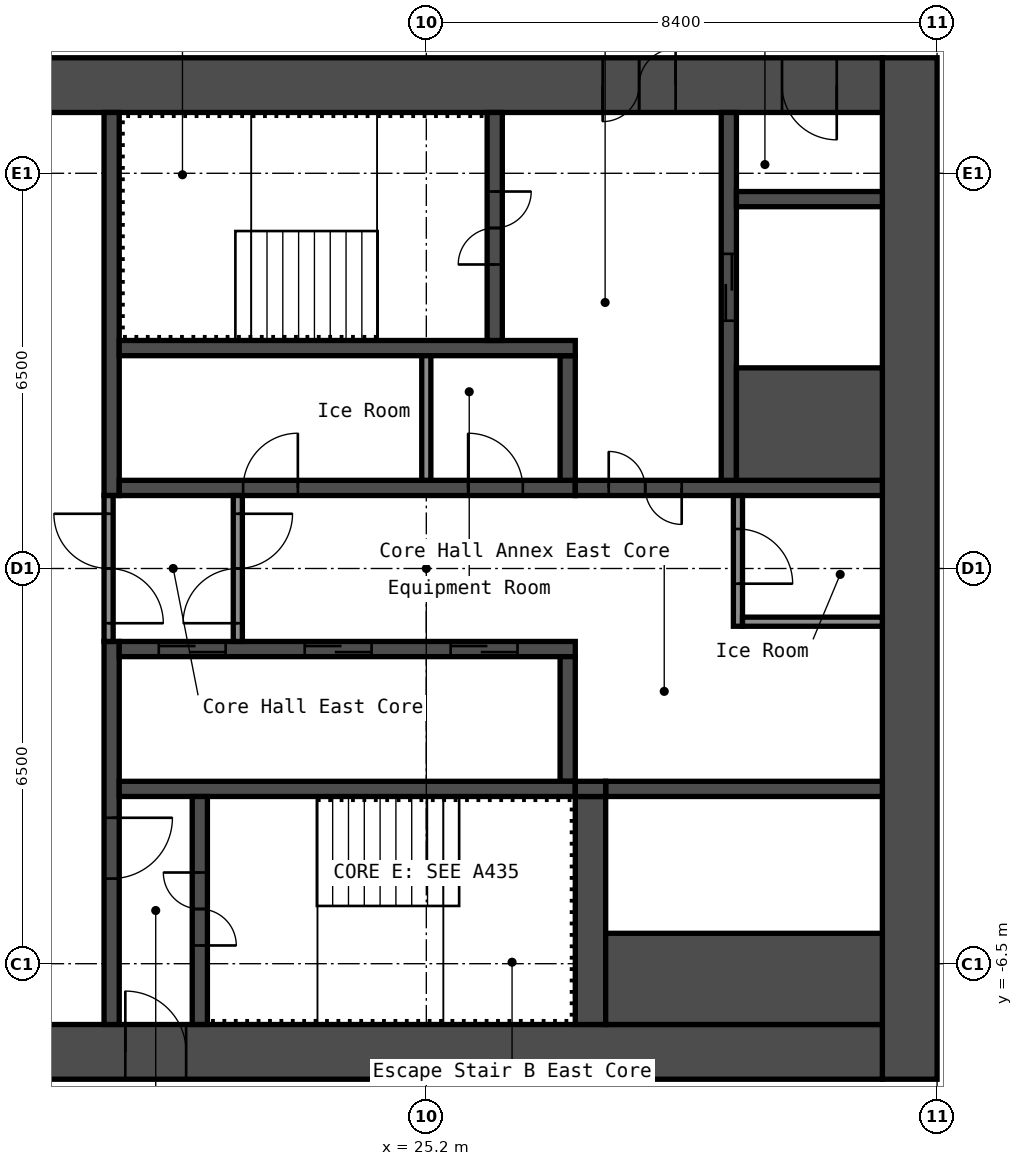
"""IFC4 building model, lengths in metres.
Left out: names, types, materials, properties, quantities, classifications, styles, units other than length and angle.
Written with IfcOpenShell. Run it as: python <this file> out.ifc"""

import sys

from ifc_helpers import new_model, si_unit, direction, frame, frame_2d, origin, place, context, subcontext, project, spatial, rectangle, extrude, element, fill, save


model = new_model("IFC4")
c1 = context("Model", 3, precision=1e-05, world=origin(), true_north=direction((0.0, 1.0)))
c2 = subcontext(c1, "Body", "Model", "MODEL_VIEW")
j1 = project(units=[si_unit("LENGTHUNIT", "METRE"), si_unit("PLANEANGLEUNIT", "RADIAN")], contexts=[c1])
p1 = place(None, origin())
s1 = spatial("IfcSite", under=j1, at=p1, CompositionType="ELEMENT")
p2 = place(p1, origin())
s2 = spatial("IfcBuilding", under=s1, at=p2, CompositionType="ELEMENT")
p3 = place(p2, frame((0.0, 0.0, 245.4)))
s3 = spatial("IfcBuildingStorey", under=s2, at=p3, CompositionType="ELEMENT", Elevation=245.4)
p4 = place(p3, frame((33.15, -8.4, 0.0), z_axis=(0.0, 0.0, 1.0), x_axis=(0.0, 1.0, 0.0)))
e1 = element("IfcWall", 1, at=p4, inside=s3, PredefinedType="SHEAR", context=c2, shape_type="SweptSolid", body=[
    extrude(rectangle(XDim=16.8, YDim=0.9, at=frame_2d((8.4, 0.0))), origin(), (0.0, 0.0, 1.0), 2.75),
])
p5 = place(p3, frame((17.7, 7.95, 0.0), z_axis=(0.0, 0.0, 1.0), x_axis=(1.0, 0.0, 0.0)))
e2 = element("IfcWall", 2, at=p5, inside=s3, PredefinedType="SHEAR", context=c2, shape_type="SweptSolid", body=[
    extrude(rectangle(XDim=15.0, YDim=0.9, at=frame_2d((7.5, 0.0))), origin(), (0.0, 0.0, 1.0), 2.75),
])
p6 = place(p5, frame((10.4, 0.0, 0.0)))
e3 = element("IfcOpeningElement", 3, at=p6, cuts=e2, PredefinedType="OPENING", context=c2, shape_type="SweptSolid", body=[
    extrude(rectangle(XDim=1.2, YDim=2.1, at=frame_2d((0.6, 1.05))), frame((0.0, 0.46, 0.0), z_axis=(0.0, -1.0, 0.0), x_axis=(1.0, 0.0, 0.0)), (0.0, 0.0, 1.0), 0.92),
])
p7 = place(p5, frame((13.35, 0.0, 0.0)))
e4 = element("IfcOpeningElement", 4, at=p7, cuts=e2, PredefinedType="OPENING", context=c2, shape_type="SweptSolid", body=[
    extrude(rectangle(XDim=0.9, YDim=2.1, at=frame_2d((0.45, 1.05))), frame((0.0, 0.46, 0.0), z_axis=(0.0, -1.0, 0.0), x_axis=(1.0, 0.0, 0.0)), (0.0, 0.0, 1.0), 0.92),
])
p8 = place(p3, frame((17.7, -7.95, 0.0), z_axis=(0.0, 0.0, 1.0), x_axis=(1.0, 0.0, 0.0)))
e5 = element("IfcWall", 5, at=p8, inside=s3, PredefinedType="SHEAR", context=c2, shape_type="SweptSolid", body=[
    extrude(rectangle(XDim=15.0, YDim=0.9, at=frame_2d((7.5, 0.0))), origin(), (0.0, 0.0, 1.0), 2.75),
])
p9 = place(p8, frame((2.55, 0.0, 0.0)))
e6 = element("IfcOpeningElement", 6, at=p9, cuts=e5, PredefinedType="OPENING", context=c2, shape_type="SweptSolid", body=[
    extrude(rectangle(XDim=1.0, YDim=2.1, at=frame_2d((0.5, 1.05))), frame((0.0, 0.46, 0.0), z_axis=(0.0, -1.0, 0.0), x_axis=(1.0, 0.0, 0.0)), (0.0, 0.0, 1.0), 0.92),
])
p10 = place(p3, frame((20.025, 1.2, 0.0), z_axis=(0.0, 0.0, 1.0), x_axis=(0.0, 1.0, 0.0)))
e7 = element("IfcWall", 7, at=p10, inside=s3, PredefinedType="SHEAR", context=c2, shape_type="SweptSolid", body=[
    extrude(rectangle(XDim=6.3, YDim=0.25, at=frame_2d((3.15, 0.0))), origin(), (0.0, 0.0, 1.0), 2.75),
])
p11 = place(p3, frame((20.025, -7.5, 0.0), z_axis=(0.0, 0.0, 1.0), x_axis=(0.0, 1.0, 0.0)))
e8 = element("IfcWall", 8, at=p11, inside=s3, PredefinedType="SHEAR", context=c2, shape_type="SweptSolid", body=[
    extrude(rectangle(XDim=6.3, YDim=0.25, at=frame_2d((3.15, 0.0))), origin(), (0.0, 0.0, 1.0), 2.75),
])
p12 = place(p11, frame((2.4, 0.0, 0.0)))
e9 = element("IfcOpeningElement", 9, at=p12, cuts=e8, PredefinedType="OPENING", context=c2, shape_type="SweptSolid", body=[
    extrude(rectangle(XDim=1.0, YDim=2.1, at=frame_2d((0.5, 1.05))), frame((0.0, 0.135, 0.0), z_axis=(0.0, -1.0, 0.0), x_axis=(1.0, 0.0, 0.0)), (0.0, 0.0, 1.0), 0.27),
])
p13 = place(p3, frame((20.15, 1.325, 0.0), z_axis=(0.0, 0.0, 1.0), x_axis=(1.0, 0.0, 0.0)))
e10 = element("IfcWall", 10, at=p13, inside=s3, PredefinedType="SHEAR", context=c2, shape_type="SweptSolid", body=[
    extrude(rectangle(XDim=7.5, YDim=0.25, at=frame_2d((3.75, 0.0))), origin(), (0.0, 0.0, 1.0), 2.75),
])
p14 = place(p13, frame((2.038, 0.0, 0.0)))
e11 = element("IfcOpeningElement", 11, at=p14, cuts=e10, PredefinedType="OPENING", context=c2, shape_type="SweptSolid", body=[
    extrude(rectangle(XDim=0.9, YDim=2.1, at=frame_2d((0.45, 1.05))), frame((0.0, 0.135, 0.0), z_axis=(0.0, -1.0, 0.0), x_axis=(1.0, 0.0, 0.0)), (0.0, 0.0, 1.0), 0.27),
])
p15 = place(p13, frame((5.738, 0.0, 0.0)))
e12 = element("IfcOpeningElement", 12, at=p15, cuts=e10, PredefinedType="OPENING", context=c2, shape_type="SweptSolid", body=[
    extrude(rectangle(XDim=0.9, YDim=2.1, at=frame_2d((0.45, 1.05))), frame((0.0, 0.135, 0.0), z_axis=(0.0, -1.0, 0.0), x_axis=(1.0, 0.0, 0.0)), (0.0, 0.0, 1.0), 0.27),
])
p16 = place(p3, frame((27.525, 1.45, 0.0), z_axis=(0.0, 0.0, 1.0), x_axis=(0.0, 1.0, 0.0)))
e13 = element("IfcWall", 13, at=p16, inside=s3, PredefinedType="SHEAR", context=c2, shape_type="SweptSolid", body=[
    extrude(rectangle(XDim=2.05, YDim=0.25, at=frame_2d((1.025, 0.0))), origin(), (0.0, 0.0, 1.0), 2.75),
])
p17 = place(p3, frame((20.15, 3.625, 0.0), z_axis=(0.0, 0.0, 1.0), x_axis=(1.0, 0.0, 0.0)))
e14 = element("IfcWall", 14, at=p17, inside=s3, PredefinedType="SHEAR", context=c2, shape_type="SweptSolid", body=[
    extrude(rectangle(XDim=7.5, YDim=0.25, at=frame_2d((3.75, 0.0))), origin(), (0.0, 0.0, 1.0), 2.75),
])
p18 = place(p3, frame((26.325, 3.75, 0.0), z_axis=(0.0, 0.0, 1.0), x_axis=(0.0, 1.0, 0.0)))
e15 = element("IfcWall", 15, at=p18, inside=s3, PredefinedType="SHEAR", context=c2, shape_type="SweptSolid", body=[
    extrude(rectangle(XDim=3.75, YDim=0.25, at=frame_2d((1.875, 0.0))), origin(), (0.0, 0.0, 1.0), 2.75),
])
p19 = place(p18, frame((1.25, 0.0, 0.0)))
e16 = element("IfcOpeningElement", 16, at=p19, cuts=e15, PredefinedType="OPENING", context=c2, shape_type="SweptSolid", body=[
    extrude(rectangle(XDim=1.2, YDim=2.1, at=frame_2d((0.6, 1.05))), frame((0.0, 0.135, 0.0), z_axis=(0.0, -1.0, 0.0), x_axis=(1.0, 0.0, 0.0)), (0.0, 0.0, 1.0), 0.27),
])
p20 = place(p3, frame((27.65, 1.325, 0.0), z_axis=(0.0, 0.0, 1.0), x_axis=(1.0, 0.0, 0.0)))
e17 = element("IfcWall", 17, at=p20, inside=s3, PredefinedType="SHEAR", context=c2, shape_type="SweptSolid", body=[
    extrude(rectangle(XDim=5.05, YDim=0.25, at=frame_2d((2.525, 0.0))), origin(), (0.0, 0.0, 1.0), 2.75),
])
p21 = place(p20, frame((0.55, 0.0, 0.0)))
e18 = element("IfcOpeningElement", 18, at=p21, cuts=e17, PredefinedType="OPENING", context=c2, shape_type="SweptSolid", body=[
    extrude(rectangle(XDim=1.2, YDim=2.1, at=frame_2d((0.6, 1.05))), frame((0.0, 0.135, 0.0), z_axis=(0.0, -1.0, 0.0), x_axis=(1.0, 0.0, 0.0)), (0.0, 0.0, 1.0), 0.27),
])
p22 = place(p3, frame((30.175, 1.45, 0.0), z_axis=(0.0, 0.0, 1.0), x_axis=(0.0, 1.0, 0.0)))
e19 = element("IfcWall", 19, at=p22, inside=s3, PredefinedType="SHEAR", context=c2, shape_type="SweptSolid", body=[
    extrude(rectangle(XDim=6.05, YDim=0.25, at=frame_2d((3.025, 0.0))), origin(), (0.0, 0.0, 1.0), 2.75),
])
p23 = place(p22, frame((2.625, 0.0, 0.0)))
e20 = element("IfcOpeningElement", 20, at=p23, cuts=e19, PredefinedType="OPENING", context=c2, shape_type="SweptSolid", body=[
    extrude(rectangle(XDim=1.1, YDim=2.1, at=frame_2d((0.55, 1.05))), frame((0.0, 0.135, 0.0), z_axis=(0.0, -1.0, 0.0), x_axis=(1.0, 0.0, 0.0)), (0.0, 0.0, 1.0), 0.27),
])
p24 = place(p3, frame((30.3, 2.375, 0.0), z_axis=(0.0, 0.0, 1.0), x_axis=(1.0, 0.0, 0.0)))
e21 = element("IfcWall", 21, at=p24, inside=s3, PredefinedType="SHEAR", context=c2, shape_type="SweptSolid", body=[
    extrude(rectangle(XDim=2.4, YDim=1.85, at=frame_2d((1.2, 0.0))), origin(), (0.0, 0.0, 1.0), 2.75),
])
p25 = place(p3, frame((30.3, 6.075, 0.0), z_axis=(0.0, 0.0, 1.0), x_axis=(1.0, 0.0, 0.0)))
e22 = element("IfcWall", 22, at=p25, inside=s3, PredefinedType="SHEAR", context=c2, shape_type="SweptSolid", body=[
    extrude(rectangle(XDim=2.4, YDim=0.25, at=frame_2d((1.2, 0.0))), origin(), (0.0, 0.0, 1.0), 2.75),
])
p26 = place(p3, frame((20.15, -1.325, 0.0), z_axis=(0.0, 0.0, 1.0), x_axis=(1.0, 0.0, 0.0)))
e23 = element("IfcWall", 23, at=p26, inside=s3, PredefinedType="SHEAR", context=c2, shape_type="SweptSolid", body=[
    extrude(rectangle(XDim=7.5, YDim=0.25, at=frame_2d((3.75, 0.0))), origin(), (0.0, 0.0, 1.0), 2.75),
])
p27 = place(p26, frame((0.65, 0.0, 0.0)))
e24 = element("IfcOpeningElement", 24, at=p27, cuts=e23, PredefinedType="OPENING", context=c2, shape_type="SweptSolid", body=[
    extrude(rectangle(XDim=1.1, YDim=2.1, at=frame_2d((0.55, 1.05))), frame((0.0, 0.135, 0.0), z_axis=(0.0, -1.0, 0.0), x_axis=(1.0, 0.0, 0.0)), (0.0, 0.0, 1.0), 0.27),
])
p28 = place(p26, frame((3.05, 0.0, 0.0)))
e25 = element("IfcOpeningElement", 25, at=p28, cuts=e23, PredefinedType="OPENING", context=c2, shape_type="SweptSolid", body=[
    extrude(rectangle(XDim=1.1, YDim=2.1, at=frame_2d((0.55, 1.05))), frame((0.0, 0.135, 0.0), z_axis=(0.0, -1.0, 0.0), x_axis=(1.0, 0.0, 0.0)), (0.0, 0.0, 1.0), 0.27),
])
p29 = place(p26, frame((5.45, 0.0, 0.0)))
e26 = element("IfcOpeningElement", 26, at=p29, cuts=e23, PredefinedType="OPENING", context=c2, shape_type="SweptSolid", body=[
    extrude(rectangle(XDim=1.1, YDim=2.1, at=frame_2d((0.55, 1.05))), frame((0.0, 0.135, 0.0), z_axis=(0.0, -1.0, 0.0), x_axis=(1.0, 0.0, 0.0)), (0.0, 0.0, 1.0), 0.27),
])
p30 = place(p3, frame((27.525, -3.5, 0.0), z_axis=(0.0, 0.0, 1.0), x_axis=(0.0, 1.0, 0.0)))
e27 = element("IfcWall", 27, at=p30, inside=s3, PredefinedType="SHEAR", context=c2, shape_type="SweptSolid", body=[
    extrude(rectangle(XDim=2.05, YDim=0.25, at=frame_2d((1.025, 0.0))), origin(), (0.0, 0.0, 1.0), 2.75),
])
p31 = place(p3, frame((20.15, -3.625, 0.0), z_axis=(0.0, 0.0, 1.0), x_axis=(1.0, 0.0, 0.0)))
e28 = element("IfcWall", 28, at=p31, inside=s3, PredefinedType="SHEAR", context=c2, shape_type="SweptSolid", body=[
    extrude(rectangle(XDim=7.5, YDim=0.25, at=frame_2d((3.75, 0.0))), origin(), (0.0, 0.0, 1.0), 2.75),
])
p32 = place(p3, frame((21.475, -7.5, 0.0), z_axis=(0.0, 0.0, 1.0), x_axis=(0.0, 1.0, 0.0)))
e29 = element("IfcWall", 29, at=p32, inside=s3, PredefinedType="SHEAR", context=c2, shape_type="SweptSolid", body=[
    extrude(rectangle(XDim=3.75, YDim=0.25, at=frame_2d((1.875, 0.0))), origin(), (0.0, 0.0, 1.0), 2.75),
])
p33 = place(p32, frame((1.3, 0.0, 0.0)))
e30 = element("IfcOpeningElement", 30, at=p33, cuts=e29, PredefinedType="OPENING", context=c2, shape_type="SweptSolid", body=[
    extrude(rectangle(XDim=1.2, YDim=2.1, at=frame_2d((0.6, 1.05))), frame((0.0, 0.135, 0.0), z_axis=(0.0, -1.0, 0.0), x_axis=(1.0, 0.0, 0.0)), (0.0, 0.0, 1.0), 0.27),
])
p34 = place(p3, frame((27.9, -7.5, 0.0), z_axis=(0.0, 0.0, 1.0), x_axis=(0.0, 1.0, 0.0)))
e31 = element("IfcWall", 31, at=p34, inside=s3, PredefinedType="SHEAR", context=c2, shape_type="SweptSolid", body=[
    extrude(rectangle(XDim=3.75, YDim=0.5, at=frame_2d((1.875, 0.0))), origin(), (0.0, 0.0, 1.0), 2.75),
])
p35 = place(p3, frame((28.15, -3.625, 0.0), z_axis=(0.0, 0.0, 1.0), x_axis=(1.0, 0.0, 0.0)))
e32 = element("IfcWall", 32, at=p35, inside=s3, PredefinedType="SHEAR", context=c2, shape_type="SweptSolid", body=[
    extrude(rectangle(XDim=4.55, YDim=0.25, at=frame_2d((2.275, 0.0))), origin(), (0.0, 0.0, 1.0), 2.75),
])
p36 = place(p3, frame((28.15, -6.75, 0.0), z_axis=(0.0, 0.0, 1.0), x_axis=(1.0, 0.0, 0.0)))
e33 = element("IfcWall", 33, at=p36, inside=s3, PredefinedType="SHEAR", context=c2, shape_type="SweptSolid", body=[
    extrude(rectangle(XDim=4.55, YDim=1.5, at=frame_2d((2.275, 0.0))), origin(), (0.0, 0.0, 1.0), 2.75),
])
p37 = place(p3, frame((27.65, -3.625, 0.0), z_axis=(0.0, 0.0, 1.0), x_axis=(1.0, 0.0, 0.0)))
e34 = element("IfcWall", 34, at=p37, inside=s3, PredefinedType="SHEAR", context=c2, shape_type="SweptSolid", body=[
    extrude(rectangle(XDim=0.5, YDim=0.25, at=frame_2d((0.25, 0.0))), origin(), (0.0, 0.0, 1.0), 2.75),
])
p38 = place(p3, frame((19.975, -1.2, 0.0), z_axis=(0.0, 0.0, 1.0), x_axis=(0.0, 1.0, 0.0)))
e35 = element("IfcWall", 35, at=p38, inside=s3, PredefinedType="PARTITIONING", context=c2, shape_type="SweptSolid", body=[
    extrude(rectangle(XDim=2.4, YDim=0.15, at=frame_2d((1.2, 0.0))), origin(), (0.0, 0.0, 1.0), 2.75),
])
p39 = place(p38, frame((0.3, 0.0, 0.0)))
e36 = element("IfcOpeningElement", 36, at=p39, cuts=e35, PredefinedType="OPENING", context=c2, shape_type="SweptSolid", body=[
    extrude(rectangle(XDim=1.8, YDim=2.1, at=frame_2d((0.9, 1.05))), frame((0.0, 0.085, 0.0), z_axis=(0.0, -1.0, 0.0), x_axis=(1.0, 0.0, 0.0)), (0.0, 0.0, 1.0), 0.17),
])
p40 = place(p3, frame((22.1, -1.2, 0.0), z_axis=(0.0, 0.0, 1.0), x_axis=(0.0, 1.0, 0.0)))
e37 = element("IfcWall", 37, at=p40, inside=s3, PredefinedType="PARTITIONING", context=c2, shape_type="SweptSolid", body=[
    extrude(rectangle(XDim=2.4, YDim=0.15, at=frame_2d((1.2, 0.0))), origin(), (0.0, 0.0, 1.0), 2.75),
])
p41 = place(p40, frame((0.3, 0.0, 0.0)))
e38 = element("IfcOpeningElement", 38, at=p41, cuts=e37, PredefinedType="OPENING", context=c2, shape_type="SweptSolid", body=[
    extrude(rectangle(XDim=1.8, YDim=2.1, at=frame_2d((0.9, 1.05))), frame((0.0, 0.085, 0.0), z_axis=(0.0, -1.0, 0.0), x_axis=(1.0, 0.0, 0.0)), (0.0, 0.0, 1.0), 0.17),
])
p42 = place(p3, frame((30.325, -0.95, 0.0), z_axis=(0.0, 0.0, 1.0), x_axis=(0.0, 1.0, 0.0)))
e39 = element("IfcWall", 39, at=p42, inside=s3, PredefinedType="PARTITIONING", context=c2, shape_type="SweptSolid", body=[
    extrude(rectangle(XDim=2.15, YDim=0.15, at=frame_2d((1.075, 0.0))), origin(), (0.0, 0.0, 1.0), 2.75),
])
p43 = place(p42, frame((0.7, 0.0, 0.0)))
e40 = element("IfcOpeningElement", 40, at=p43, cuts=e39, PredefinedType="OPENING", context=c2, shape_type="SweptSolid", body=[
    extrude(rectangle(XDim=0.9, YDim=2.1, at=frame_2d((0.45, 1.05))), frame((0.0, 0.085, 0.0), z_axis=(0.0, -1.0, 0.0), x_axis=(1.0, 0.0, 0.0)), (0.0, 0.0, 1.0), 0.17),
])
p44 = place(p3, frame((30.4, -0.875, 0.0), z_axis=(0.0, 0.0, 1.0), x_axis=(1.0, 0.0, 0.0)))
e41 = element("IfcWall", 41, at=p44, inside=s3, PredefinedType="PARTITIONING", context=c2, shape_type="SweptSolid", body=[
    extrude(rectangle(XDim=2.3, YDim=0.15, at=frame_2d((1.15, 0.0))), origin(), (0.0, 0.0, 1.0), 2.75),
])
p45 = place(p3, frame((25.2, 1.45, 0.0), z_axis=(0.0, 0.0, 1.0), x_axis=(0.0, 1.0, 0.0)))
e42 = element("IfcWall", 42, at=p45, inside=s3, PredefinedType="PARTITIONING", context=c2, shape_type="SweptSolid", body=[
    extrude(rectangle(XDim=2.05, YDim=0.15, at=frame_2d((1.025, 0.0))), origin(), (0.0, 0.0, 1.0), 2.75),
])
p46 = place(p6, origin())
e43 = element("IfcDoor", 43, at=p46, inside=s3, OperationType="DOUBLE_DOOR_SINGLE_SWING", PredefinedType="DOOR", context=c2, shape_type="SweptSolid", body=[
    extrude(rectangle(XDim=1.2, YDim=2.1, at=frame_2d((0.6, 1.05))), frame((0.0, 0.025, 0.0), z_axis=(0.0, -1.0, 0.0), x_axis=(1.0, 0.0, 0.0)), (0.0, 0.0, 1.0), 0.05),
])
fill(e3, e43)
p47 = place(p7, origin())
e44 = element("IfcDoor", 44, at=p47, inside=s3, OperationType="SINGLE_SWING_RIGHT", PredefinedType="DOOR", context=c2, shape_type="SweptSolid", body=[
    extrude(rectangle(XDim=0.9, YDim=2.1, at=frame_2d((0.45, 1.05))), frame((0.0, 0.025, 0.0), z_axis=(0.0, -1.0, 0.0), x_axis=(1.0, 0.0, 0.0)), (0.0, 0.0, 1.0), 0.05),
])
fill(e4, e44)
p48 = place(p9, origin())
e45 = element("IfcDoor", 45, at=p48, inside=s3, OperationType="SINGLE_SWING_RIGHT", PredefinedType="DOOR", context=c2, shape_type="SweptSolid", body=[
    extrude(rectangle(XDim=1.0, YDim=2.1, at=frame_2d((0.5, 1.05))), frame((0.0, 0.025, 0.0), z_axis=(0.0, -1.0, 0.0), x_axis=(1.0, 0.0, 0.0)), (0.0, 0.0, 1.0), 0.05),
])
fill(e6, e45)
p49 = place(p19, origin())
e46 = element("IfcDoor", 46, at=p49, inside=s3, OperationType="DOUBLE_DOOR_SINGLE_SWING", PredefinedType="DOOR", context=c2, shape_type="SweptSolid", body=[
    extrude(rectangle(XDim=1.2, YDim=2.1, at=frame_2d((0.6, 1.05))), frame((0.0, 0.025, 0.0), z_axis=(0.0, -1.0, 0.0), x_axis=(1.0, 0.0, 0.0)), (0.0, 0.0, 1.0), 0.05),
])
fill(e16, e46)
p50 = place(p33, origin())
e47 = element("IfcDoor", 47, at=p50, inside=s3, OperationType="DOUBLE_DOOR_SINGLE_SWING", PredefinedType="DOOR", context=c2, shape_type="SweptSolid", body=[
    extrude(rectangle(XDim=1.2, YDim=2.1, at=frame_2d((0.6, 1.05))), frame((0.0, 0.025, 0.0), z_axis=(0.0, -1.0, 0.0), x_axis=(1.0, 0.0, 0.0)), (0.0, 0.0, 1.0), 0.05),
])
fill(e30, e47)
p51 = place(p12, origin())
e48 = element("IfcDoor", 48, at=p51, inside=s3, OperationType="SINGLE_SWING_RIGHT", PredefinedType="DOOR", context=c2, shape_type="SweptSolid", body=[
    extrude(rectangle(XDim=1.0, YDim=2.1, at=frame_2d((0.5, 1.05))), frame((0.0, 0.025, 0.0), z_axis=(0.0, -1.0, 0.0), x_axis=(1.0, 0.0, 0.0)), (0.0, 0.0, 1.0), 0.05),
])
fill(e9, e48)
p52 = place(p21, origin())
e49 = element("IfcDoor", 49, at=p52, inside=s3, OperationType="DOUBLE_DOOR_SINGLE_SWING", PredefinedType="DOOR", context=c2, shape_type="SweptSolid", body=[
    extrude(rectangle(XDim=1.2, YDim=2.1, at=frame_2d((0.6, 1.05))), frame((0.0, 0.025, 0.0), z_axis=(0.0, -1.0, 0.0), x_axis=(1.0, 0.0, 0.0)), (0.0, 0.0, 1.0), 0.05),
])
fill(e18, e49)
p53 = place(p39, origin())
e50 = element("IfcDoor", 50, at=p53, inside=s3, OperationType="DOUBLE_DOOR_SINGLE_SWING", PredefinedType="DOOR", context=c2, shape_type="SweptSolid", body=[
    extrude(rectangle(XDim=1.8, YDim=2.1, at=frame_2d((0.9, 1.05))), frame((0.0, 0.025, 0.0), z_axis=(0.0, -1.0, 0.0), x_axis=(1.0, 0.0, 0.0)), (0.0, 0.0, 1.0), 0.05),
])
fill(e36, e50)
p54 = place(p41, origin())
e51 = element("IfcDoor", 51, at=p54, inside=s3, OperationType="DOUBLE_DOOR_SINGLE_SWING", PredefinedType="DOOR", context=c2, shape_type="SweptSolid", body=[
    extrude(rectangle(XDim=1.8, YDim=2.1, at=frame_2d((0.9, 1.05))), frame((0.0, 0.025, 0.0), z_axis=(0.0, -1.0, 0.0), x_axis=(1.0, 0.0, 0.0)), (0.0, 0.0, 1.0), 0.05),
])
fill(e38, e51)
p55 = place(p43, origin())
e52 = element("IfcDoor", 52, at=p55, inside=s3, OperationType="SINGLE_SWING_LEFT", PredefinedType="DOOR", context=c2, shape_type="SweptSolid", body=[
    extrude(rectangle(XDim=0.9, YDim=2.1, at=frame_2d((0.45, 1.05))), frame((0.0, 0.025, 0.0), z_axis=(0.0, -1.0, 0.0), x_axis=(1.0, 0.0, 0.0)), (0.0, 0.0, 1.0), 0.05),
])
fill(e40, e52)
p56 = place(p14, origin())
e53 = element("IfcDoor", 53, at=p56, inside=s3, OperationType="SINGLE_SWING_LEFT", PredefinedType="DOOR", context=c2, shape_type="SweptSolid", body=[
    extrude(rectangle(XDim=0.9, YDim=2.1, at=frame_2d((0.45, 1.05))), frame((0.0, 0.025, 0.0), z_axis=(0.0, -1.0, 0.0), x_axis=(1.0, 0.0, 0.0)), (0.0, 0.0, 1.0), 0.05),
])
fill(e11, e53)
p57 = place(p15, origin())
e54 = element("IfcDoor", 54, at=p57, inside=s3, OperationType="SINGLE_SWING_RIGHT", PredefinedType="DOOR", context=c2, shape_type="SweptSolid", body=[
    extrude(rectangle(XDim=0.9, YDim=2.1, at=frame_2d((0.45, 1.05))), frame((0.0, 0.025, 0.0), z_axis=(0.0, -1.0, 0.0), x_axis=(1.0, 0.0, 0.0)), (0.0, 0.0, 1.0), 0.05),
])
fill(e12, e54)
p58 = place(p27, origin())
e55 = element("IfcDoor", 55, at=p58, inside=s3, OperationType="DOUBLE_DOOR_SLIDING", PredefinedType="DOOR", context=c2, shape_type="SweptSolid", body=[
    extrude(rectangle(XDim=1.1, YDim=2.1, at=frame_2d((0.55, 1.05))), frame((0.0, 0.025, 0.0), z_axis=(0.0, -1.0, 0.0), x_axis=(1.0, 0.0, 0.0)), (0.0, 0.0, 1.0), 0.05),
])
fill(e24, e55)
p59 = place(p28, origin())
e56 = element("IfcDoor", 56, at=p59, inside=s3, OperationType="DOUBLE_DOOR_SLIDING", PredefinedType="DOOR", context=c2, shape_type="SweptSolid", body=[
    extrude(rectangle(XDim=1.1, YDim=2.1, at=frame_2d((0.55, 1.05))), frame((0.0, 0.025, 0.0), z_axis=(0.0, -1.0, 0.0), x_axis=(1.0, 0.0, 0.0)), (0.0, 0.0, 1.0), 0.05),
])
fill(e25, e56)
p60 = place(p29, origin())
e57 = element("IfcDoor", 57, at=p60, inside=s3, OperationType="DOUBLE_DOOR_SLIDING", PredefinedType="DOOR", context=c2, shape_type="SweptSolid", body=[
    extrude(rectangle(XDim=1.1, YDim=2.1, at=frame_2d((0.55, 1.05))), frame((0.0, 0.025, 0.0), z_axis=(0.0, -1.0, 0.0), x_axis=(1.0, 0.0, 0.0)), (0.0, 0.0, 1.0), 0.05),
])
fill(e26, e57)
p61 = place(p23, origin())
e58 = element("IfcDoor", 58, at=p61, inside=s3, OperationType="DOUBLE_DOOR_SLIDING", PredefinedType="DOOR", context=c2, shape_type="SweptSolid", body=[
    extrude(rectangle(XDim=1.1, YDim=2.1, at=frame_2d((0.55, 1.05))), frame((0.0, 0.025, 0.0), z_axis=(0.0, -1.0, 0.0), x_axis=(1.0, 0.0, 0.0)), (0.0, 0.0, 1.0), 0.05),
])
fill(e20, e58)
save(model, sys.argv[1])
